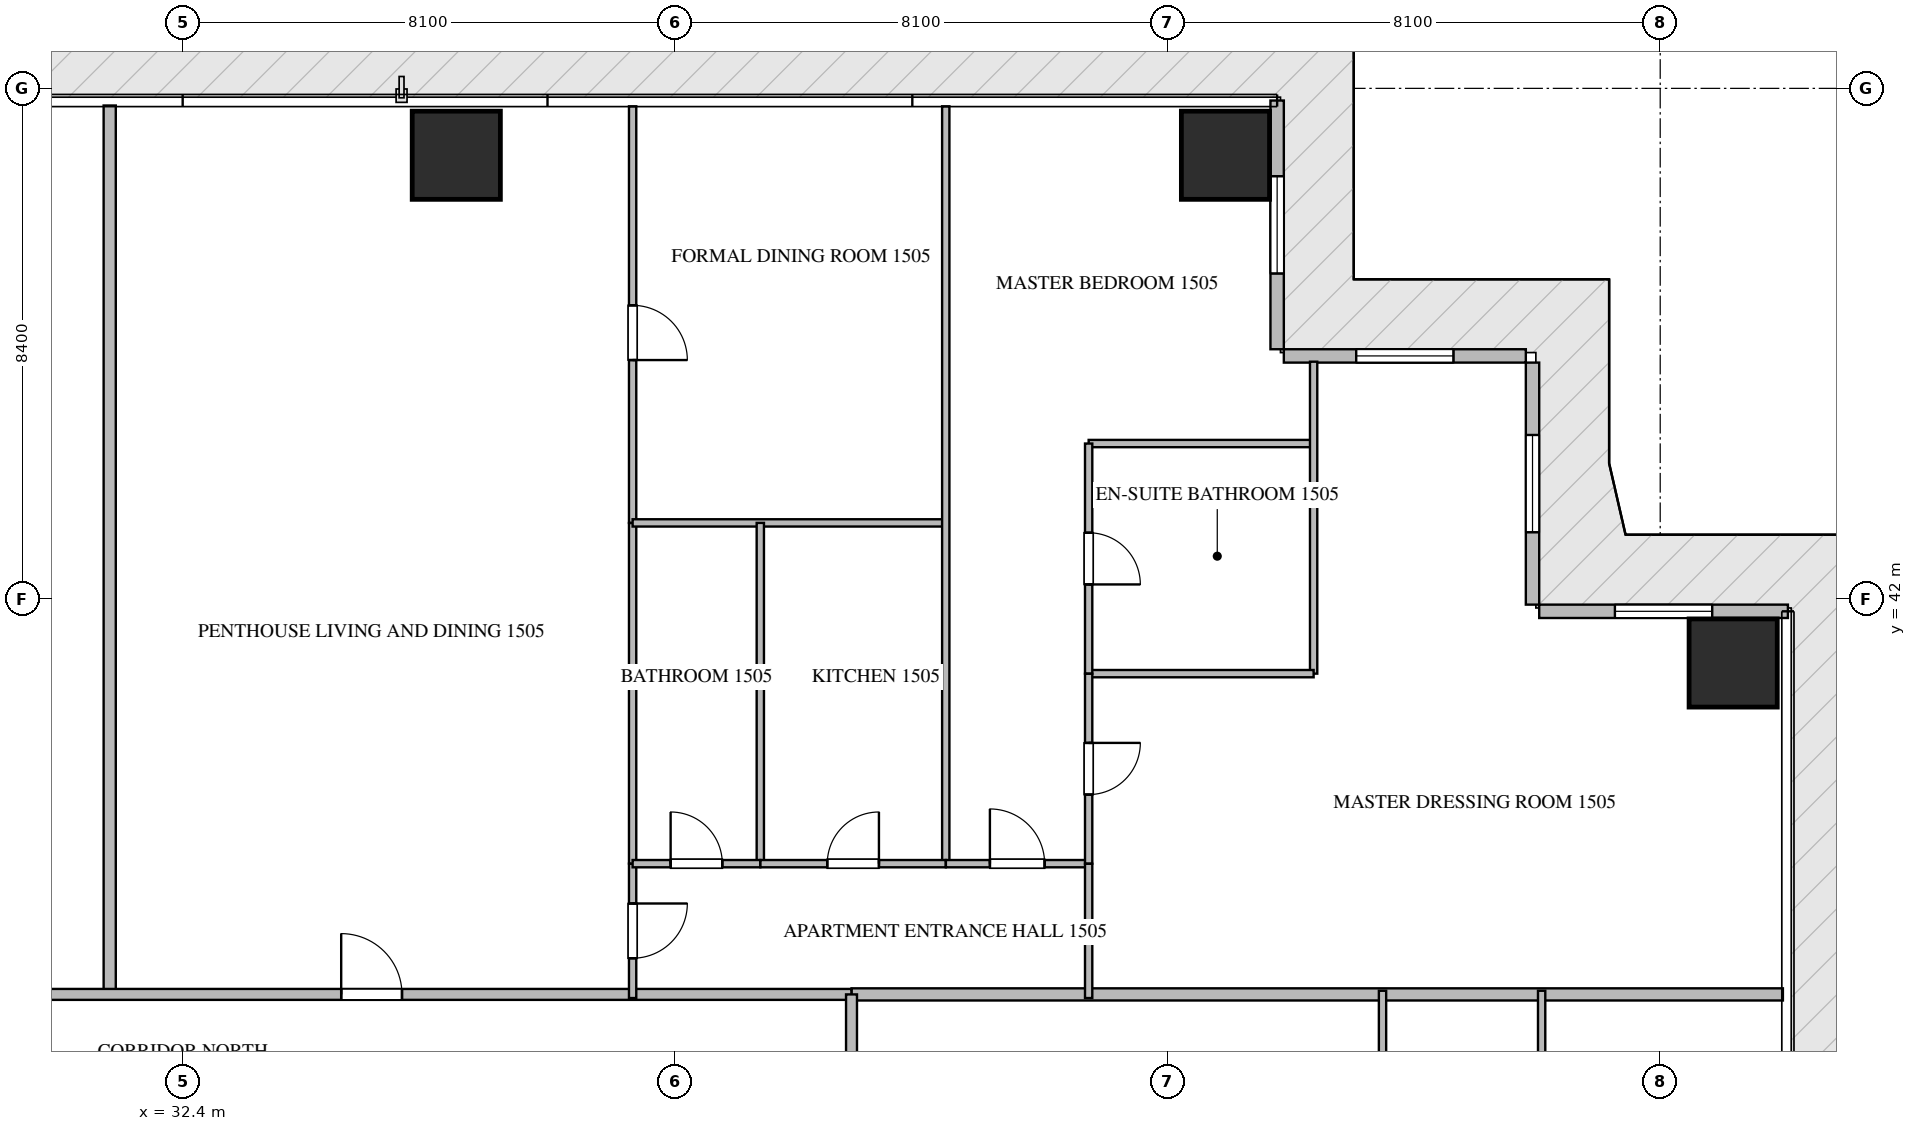
"""IFC4 building model, lengths in metres.
Left out: names, types, materials, properties, quantities, classifications, styles, units other than length and angle.
Written with IfcOpenShell. Run it as: python <this file> out.ifc"""

import sys

from ifc_helpers import new_model, si_unit, direction, frame, frame_2d, origin, origin_2d, place, context, subcontext, project, spatial, rectangle, extrude, source, transform, mapped, element, fill, save


model = new_model("IFC4")
c1 = context("Model", 3, precision=1e-05, world=origin(), true_north=direction((0.0, 1.0)))
c2 = subcontext(c1, "Body", "Model", "MODEL_VIEW")
j1 = project(units=[si_unit("LENGTHUNIT", "METRE"), si_unit("PLANEANGLEUNIT", "RADIAN")], contexts=[c1])
p1 = place(None, origin())
s1 = spatial("IfcSite", under=j1, at=p1, CompositionType="ELEMENT")
p2 = place(p1, origin())
s2 = spatial("IfcBuilding", under=s1, at=p2, CompositionType="ELEMENT")
p3 = place(p2, frame((0.0, 0.0, 64.2)))
s3 = spatial("IfcBuildingStorey", under=s2, at=p3, CompositionType="ELEMENT", Elevation=64.2)
m1 = source(origin(), c2, "Body", "SweptSolid", [
    extrude(rectangle(XDim=1.45, YDim=1.45, at=origin_2d()), origin(), (0.0, 0.0, 1.0), 3.75),
])
for number, where, z_axis, x_axis in (
    (1, (36.9, 49.3, -0.26), (0.0, 0.0, 1.0), (1.0, 0.0, 0.0)),
    (2, (49.55, 49.3, -0.26), (0.0, 0.0, 1.0), (1.0, 0.0, 0.0)),
    (3, (57.9, 40.95, -0.26), (0.0, 0.0, 1.0), (1.0, 0.0, 0.0)),
):
    element("IfcColumn", number, at=place(p3, frame(where, z_axis=z_axis, x_axis=x_axis)), inside=s3, PredefinedType="COLUMN", context=c2, shape_type="MappedRepresentation", body=[
        mapped(m1, transform((0.0, 0.0, 0.0), scale=1.0)),
    ])
p4 = place(p3, frame((58.8, 41.8, 0.0), z_axis=(0.0, 0.0, 1.0), x_axis=(-1.0, 0.0, 0.0)))
e4 = element("IfcWall", 4, at=p4, inside=s3, PredefinedType="ELEMENTEDWALL", context=c2, shape_type="SweptSolid", body=[
    extrude(rectangle(XDim=4.09, YDim=0.22, at=frame_2d((2.045, 0.0))), origin(), (0.0, 0.0, 1.0), 3.475),
])
p5 = place(p4, frame((1.245, 0.0, 0.65)))
e5 = element("IfcOpeningElement", 5, at=p5, cuts=e4, PredefinedType="OPENING", context=c2, shape_type="SweptSolid", body=[
    extrude(rectangle(XDim=1.6, YDim=2.1, at=frame_2d((0.8, 1.05))), frame((0.0, 0.12, 0.0), z_axis=(0.0, -1.0, 0.0), x_axis=(1.0, 0.0, 0.0)), (0.0, 0.0, 1.0), 0.24),
])
p6 = place(p3, frame((54.6, 41.91, 0.0), z_axis=(0.0, 0.0, 1.0), x_axis=(0.0, 1.0, 0.0)))
e6 = element("IfcWall", 6, at=p6, inside=s3, PredefinedType="ELEMENTEDWALL", context=c2, shape_type="SweptSolid", body=[
    extrude(rectangle(XDim=3.98, YDim=0.22, at=frame_2d((1.99, 0.0))), origin(), (0.0, 0.0, 1.0), 3.475),
])
p7 = place(p6, frame((1.19, 0.0, 0.65)))
e7 = element("IfcOpeningElement", 7, at=p7, cuts=e6, PredefinedType="OPENING", context=c2, shape_type="SweptSolid", body=[
    extrude(rectangle(XDim=1.6, YDim=2.1, at=frame_2d((0.8, 1.05))), frame((0.0, 0.12, 0.0), z_axis=(0.0, -1.0, 0.0), x_axis=(1.0, 0.0, 0.0)), (0.0, 0.0, 1.0), 0.24),
])
p8 = place(p3, frame((54.49, 46.0, 0.0), z_axis=(0.0, 0.0, 1.0), x_axis=(-1.0, 0.0, 0.0)))
e8 = element("IfcWall", 8, at=p8, inside=s3, PredefinedType="ELEMENTEDWALL", context=c2, shape_type="SweptSolid", body=[
    extrude(rectangle(XDim=3.98, YDim=0.22, at=frame_2d((1.99, 0.0))), origin(), (0.0, 0.0, 1.0), 3.475),
])
p9 = place(p8, frame((1.19, 0.0, 0.65)))
e9 = element("IfcOpeningElement", 9, at=p9, cuts=e8, PredefinedType="OPENING", context=c2, shape_type="SweptSolid", body=[
    extrude(rectangle(XDim=1.6, YDim=2.1, at=frame_2d((0.8, 1.05))), frame((0.0, 0.12, 0.0), z_axis=(0.0, -1.0, 0.0), x_axis=(1.0, 0.0, 0.0)), (0.0, 0.0, 1.0), 0.24),
])
p10 = place(p3, frame((50.4, 46.11, 0.0), z_axis=(0.0, 0.0, 1.0), x_axis=(0.0, 1.0, 0.0)))
e10 = element("IfcWall", 10, at=p10, inside=s3, PredefinedType="ELEMENTEDWALL", context=c2, shape_type="SweptSolid", body=[
    extrude(rectangle(XDim=4.09, YDim=0.22, at=frame_2d((2.045, 0.0))), origin(), (0.0, 0.0, 1.0), 3.475),
])
p11 = place(p10, frame((1.245, 0.0, 0.65)))
e11 = element("IfcOpeningElement", 11, at=p11, cuts=e10, PredefinedType="OPENING", context=c2, shape_type="SweptSolid", body=[
    extrude(rectangle(XDim=1.6, YDim=2.1, at=frame_2d((0.8, 1.05))), frame((0.0, 0.12, 0.0), z_axis=(0.0, -1.0, 0.0), x_axis=(1.0, 0.0, 0.0)), (0.0, 0.0, 1.0), 0.24),
])
p12 = place(p3, frame((31.2, 35.5, 0.0), z_axis=(0.0, 0.0, 1.0), x_axis=(0.0, 1.0, 0.0)))
e12 = element("IfcWall", 12, at=p12, inside=s3, PredefinedType="PARTITIONING", context=c2, shape_type="SweptSolid", body=[
    extrude(rectangle(XDim=14.618, YDim=0.2, at=frame_2d((7.309, 0.0))), origin(), (0.0, 0.0, 1.0), 3.49),
])
p13 = place(p3, frame((43.4, 35.5, 0.0), z_axis=(0.0, 0.0, 1.0), x_axis=(1.0, 0.0, 0.0)))
e13 = element("IfcWall", 13, at=p13, inside=s3, PredefinedType="PARTITIONING", context=c2, shape_type="SweptSolid", body=[
    extrude(rectangle(XDim=15.318, YDim=0.2, at=frame_2d((7.659, 0.0))), origin(), (0.0, 0.0, 1.0), 3.49),
])
p14 = place(p3, frame((21.402, 35.5, 0.0), z_axis=(0.0, 0.0, 1.0), x_axis=(1.0, 0.0, 0.0)))
e14 = element("IfcWall", 14, at=p14, inside=s3, PredefinedType="PARTITIONING", context=c2, shape_type="SweptSolid", body=[
    extrude(rectangle(XDim=21.996, YDim=0.18, at=frame_2d((10.998, 0.0))), origin(), (0.0, 0.0, 1.0), 3.49),
])
p15 = place(p14, frame((6.425, 0.0, 0.0)))
e15 = element("IfcOpeningElement", 15, at=p15, cuts=e14, PredefinedType="OPENING", context=c2, shape_type="SweptSolid", body=[
    extrude(rectangle(XDim=1.0, YDim=2.15, at=frame_2d((0.5, 1.075))), frame((0.0, 0.1, 0.0), z_axis=(0.0, -1.0, 0.0), x_axis=(1.0, 0.0, 0.0)), (0.0, 0.0, 1.0), 0.2),
])
p16 = place(p14, frame((13.605, 0.0, 0.0)))
e16 = element("IfcOpeningElement", 16, at=p16, cuts=e14, PredefinedType="OPENING", context=c2, shape_type="SweptSolid", body=[
    extrude(rectangle(XDim=1.0, YDim=2.15, at=frame_2d((0.5, 1.075))), frame((0.0, 0.1, 0.0), z_axis=(0.0, -1.0, 0.0), x_axis=(1.0, 0.0, 0.0)), (0.0, 0.0, 1.0), 0.2),
])
p17 = place(p3, frame((43.4, 14.9, 0.0), z_axis=(0.0, 0.0, 1.0), x_axis=(0.0, 1.0, 0.0)))
e17 = element("IfcWall", 17, at=p17, inside=s3, PredefinedType="PARTITIONING", context=c2, shape_type="SweptSolid", body=[
    extrude(rectangle(XDim=20.6, YDim=0.18, at=frame_2d((10.3, 0.0))), origin(), (0.0, 0.0, 1.0), 3.49),
])
p18 = place(p17, frame((1.96, 0.0, 0.0)))
e18 = element("IfcOpeningElement", 18, at=p18, cuts=e17, PredefinedType="OPENING", context=c2, shape_type="SweptSolid", body=[
    extrude(rectangle(XDim=1.0, YDim=2.15, at=frame_2d((0.5, 1.075))), frame((0.0, 0.1, 0.0), z_axis=(0.0, -1.0, 0.0), x_axis=(1.0, 0.0, 0.0)), (0.0, 0.0, 1.0), 0.2),
])
p19 = place(p3, frame((39.8, 37.65, 0.0), z_axis=(0.0, 0.0, 1.0), x_axis=(0.0, -1.0, 0.0)))
e19 = element("IfcWall", 19, at=p19, inside=s3, PredefinedType="PARTITIONING", context=c2, shape_type="SweptSolid", body=[
    extrude(rectangle(XDim=2.21, YDim=0.12, at=frame_2d((1.105, 0.0))), origin(), (0.0, 0.0, 1.0), 3.49),
])
p20 = place(p19, frame((0.655, 0.0, 0.0)))
e20 = element("IfcOpeningElement", 20, at=p20, cuts=e19, PredefinedType="OPENING", context=c2, shape_type="SweptSolid", body=[
    extrude(rectangle(XDim=0.9, YDim=2.1, at=frame_2d((0.45, 1.05))), frame((0.0, 0.07, 0.0), z_axis=(0.0, -1.0, 0.0), x_axis=(1.0, 0.0, 0.0)), (0.0, 0.0, 1.0), 0.14),
])
p21 = place(p3, frame((39.8, 50.105, 0.0), z_axis=(0.0, 0.0, 1.0), x_axis=(0.0, -1.0, 0.0)))
e21 = element("IfcWall", 21, at=p21, inside=s3, PredefinedType="PARTITIONING", context=c2, shape_type="SweptSolid", body=[
    extrude(rectangle(XDim=6.851, YDim=0.12, at=frame_2d((3.426, 0.0))), origin(), (0.0, 0.0, 1.0), 3.49),
])
p22 = place(p21, frame((3.273, 0.0, 0.0)))
e22 = element("IfcOpeningElement", 22, at=p22, cuts=e21, PredefinedType="OPENING", context=c2, shape_type="SweptSolid", body=[
    extrude(rectangle(XDim=0.9, YDim=2.1, at=frame_2d((0.45, 1.05))), frame((0.0, 0.07, 0.0), z_axis=(0.0, -1.0, 0.0), x_axis=(1.0, 0.0, 0.0)), (0.0, 0.0, 1.0), 0.14),
])
p23 = place(p3, frame((39.8, 43.252, 0.0), z_axis=(0.0, 0.0, 1.0), x_axis=(0.0, -1.0, 0.0)))
e23 = element("IfcWall", 23, at=p23, inside=s3, PredefinedType="PARTITIONING", context=c2, shape_type="SweptSolid", body=[
    extrude(rectangle(XDim=5.6, YDim=0.12, at=frame_2d((2.8, 0.0))), origin(), (0.0, 0.0, 1.0), 3.49),
])
p24 = place(p3, frame((39.8, 43.254, 0.0), z_axis=(0.0, 0.0, 1.0), x_axis=(1.0, 0.0, 0.0)))
e24 = element("IfcWall", 24, at=p24, inside=s3, PredefinedType="PARTITIONING", context=c2, shape_type="SweptSolid", body=[
    extrude(rectangle(XDim=5.15, YDim=0.12, at=frame_2d((2.575, 0.0))), origin(), (0.0, 0.0, 1.0), 3.49),
])
p25 = place(p3, frame((44.95, 50.105, 0.0), z_axis=(0.0, 0.0, 1.0), x_axis=(0.0, -1.0, 0.0)))
e25 = element("IfcWall", 25, at=p25, inside=s3, PredefinedType="PARTITIONING", context=c2, shape_type="SweptSolid", body=[
    extrude(rectangle(XDim=12.455, YDim=0.12, at=frame_2d((6.228, 0.0))), origin(), (0.0, 0.0, 1.0), 3.49),
])
p26 = place(p3, frame((41.9, 43.254, 0.0), z_axis=(0.0, 0.0, 1.0), x_axis=(0.0, -1.0, 0.0)))
e26 = element("IfcWall", 26, at=p26, inside=s3, PredefinedType="PARTITIONING", context=c2, shape_type="SweptSolid", body=[
    extrude(rectangle(XDim=5.604, YDim=0.12, at=frame_2d((2.802, 0.0))), origin(), (0.0, 0.0, 1.0), 3.49),
])
p27 = place(p3, frame((39.8, 37.65, 0.0), z_axis=(0.0, 0.0, 1.0), x_axis=(1.0, 0.0, 0.0)))
e27 = element("IfcWall", 27, at=p27, inside=s3, PredefinedType="PARTITIONING", context=c2, shape_type="SweptSolid", body=[
    extrude(rectangle(XDim=2.1, YDim=0.12, at=frame_2d((1.05, 0.0))), origin(), (0.0, 0.0, 1.0), 3.49),
])
p28 = place(p27, frame((0.625, 0.0, 0.0)))
e28 = element("IfcOpeningElement", 28, at=p28, cuts=e27, PredefinedType="OPENING", context=c2, shape_type="SweptSolid", body=[
    extrude(rectangle(XDim=0.85, YDim=2.1, at=frame_2d((0.425, 1.05))), frame((0.0, 0.07, 0.0), z_axis=(0.0, -1.0, 0.0), x_axis=(1.0, 0.0, 0.0)), (0.0, 0.0, 1.0), 0.14),
])
p29 = place(p3, frame((41.902, 37.65, 0.0), z_axis=(0.0, 0.0, 1.0), x_axis=(1.0, 0.0, 0.0)))
e29 = element("IfcWall", 29, at=p29, inside=s3, PredefinedType="PARTITIONING", context=c2, shape_type="SweptSolid", body=[
    extrude(rectangle(XDim=3.048, YDim=0.12, at=frame_2d((1.524, 0.0))), origin(), (0.0, 0.0, 1.0), 3.49),
])
p30 = place(p29, frame((1.099, 0.0, 0.0)))
e30 = element("IfcOpeningElement", 30, at=p30, cuts=e29, PredefinedType="OPENING", context=c2, shape_type="SweptSolid", body=[
    extrude(rectangle(XDim=0.85, YDim=2.1, at=frame_2d((0.425, 1.05))), frame((0.0, 0.07, 0.0), z_axis=(0.0, -1.0, 0.0), x_axis=(1.0, 0.0, 0.0)), (0.0, 0.0, 1.0), 0.14),
])
p31 = place(p3, frame((44.952, 37.65, 0.0), z_axis=(0.0, 0.0, 1.0), x_axis=(1.0, 0.0, 0.0)))
e31 = element("IfcWall", 31, at=p31, inside=s3, PredefinedType="PARTITIONING", context=c2, shape_type="SweptSolid", body=[
    extrude(rectangle(XDim=2.348, YDim=0.12, at=frame_2d((1.174, 0.0))), origin(), (0.0, 0.0, 1.0), 3.49),
])
p32 = place(p31, frame((0.724, 0.0, 0.0)))
e32 = element("IfcOpeningElement", 32, at=p32, cuts=e31, PredefinedType="OPENING", context=c2, shape_type="SweptSolid", body=[
    extrude(rectangle(XDim=0.9, YDim=2.1, at=frame_2d((0.45, 1.05))), frame((0.0, 0.07, 0.0), z_axis=(0.0, -1.0, 0.0), x_axis=(1.0, 0.0, 0.0)), (0.0, 0.0, 1.0), 0.14),
])
p33 = place(p3, frame((47.3, 44.559, 0.0), z_axis=(0.0, 0.0, 1.0), x_axis=(1.0, 0.0, 0.0)))
e33 = element("IfcWall", 33, at=p33, inside=s3, PredefinedType="PARTITIONING", context=c2, shape_type="SweptSolid", body=[
    extrude(rectangle(XDim=3.7, YDim=0.12, at=frame_2d((1.85, 0.0))), origin(), (0.0, 0.0, 1.0), 3.49),
])
p34 = place(p3, frame((51.0, 45.905, 0.0), z_axis=(0.0, 0.0, 1.0), x_axis=(0.0, -1.0, 0.0)))
e34 = element("IfcWall", 34, at=p34, inside=s3, PredefinedType="PARTITIONING", context=c2, shape_type="SweptSolid", body=[
    extrude(rectangle(XDim=5.13, YDim=0.12, at=frame_2d((2.565, 0.0))), origin(), (0.0, 0.0, 1.0), 3.49),
])
p35 = place(p3, frame((47.3, 40.775, 0.0), z_axis=(0.0, 0.0, 1.0), x_axis=(1.0, 0.0, 0.0)))
e35 = element("IfcWall", 35, at=p35, inside=s3, PredefinedType="PARTITIONING", context=c2, shape_type="SweptSolid", body=[
    extrude(rectangle(XDim=3.7, YDim=0.12, at=frame_2d((1.85, 0.0))), origin(), (0.0, 0.0, 1.0), 2.922),
])
p36 = place(p3, frame((47.3, 44.559, 0.0), z_axis=(0.0, 0.0, 1.0), x_axis=(0.0, -1.0, 0.0)))
e36 = element("IfcWall", 36, at=p36, inside=s3, PredefinedType="PARTITIONING", context=c2, shape_type="SweptSolid", body=[
    extrude(rectangle(XDim=3.784, YDim=0.12, at=frame_2d((1.892, 0.0))), origin(), (0.0, 0.0, 1.0), 3.49),
])
p37 = place(p36, frame((1.467, 0.0, 0.0)))
e37 = element("IfcOpeningElement", 37, at=p37, cuts=e36, PredefinedType="OPENING", context=c2, shape_type="SweptSolid", body=[
    extrude(rectangle(XDim=0.85, YDim=2.1, at=frame_2d((0.425, 1.05))), frame((0.0, 0.07, 0.0), z_axis=(0.0, -1.0, 0.0), x_axis=(1.0, 0.0, 0.0)), (0.0, 0.0, 1.0), 0.14),
])
p38 = place(p3, frame((47.3, 40.773, 0.0), z_axis=(0.0, 0.0, 1.0), x_axis=(0.0, -1.0, 0.0)))
e38 = element("IfcWall", 38, at=p38, inside=s3, PredefinedType="PARTITIONING", context=c2, shape_type="SweptSolid", body=[
    extrude(rectangle(XDim=3.123, YDim=0.12, at=frame_2d((1.562, 0.0))), origin(), (0.0, 0.0, 1.0), 3.49),
])
p39 = place(p38, frame((1.137, 0.0, 0.0)))
e39 = element("IfcOpeningElement", 39, at=p39, cuts=e38, PredefinedType="OPENING", context=c2, shape_type="SweptSolid", body=[
    extrude(rectangle(XDim=0.85, YDim=2.1, at=frame_2d((0.425, 1.05))), frame((0.0, 0.07, 0.0), z_axis=(0.0, -1.0, 0.0), x_axis=(1.0, 0.0, 0.0)), (0.0, 0.0, 1.0), 0.14),
])
p40 = place(p3, frame((47.3, 37.648, 0.0), z_axis=(0.0, 0.0, 1.0), x_axis=(0.0, -1.0, 0.0)))
e40 = element("IfcWall", 40, at=p40, inside=s3, PredefinedType="PARTITIONING", context=c2, shape_type="SweptSolid", body=[
    extrude(rectangle(XDim=2.208, YDim=0.12, at=frame_2d((1.104, 0.0))), origin(), (0.0, 0.0, 1.0), 3.49),
])
for number, where, z_axis, x_axis in (
    (41, (54.75, 30.15, 0.0), (0.0, 0.0, 1.0), (0.0, 1.0, 0.0)),
    (42, (52.133, 30.15, 0.0), (0.0, 0.0, 1.0), (0.0, 1.0, 0.0)),
):
    element("IfcWall", number, at=place(p3, frame(where, z_axis=z_axis, x_axis=x_axis)), inside=s3, PredefinedType="PARTITIONING", context=c2, shape_type="SweptSolid", body=[
        extrude(rectangle(XDim=5.41, YDim=0.12, at=frame_2d((2.705, 0.0))), origin(), (0.0, 0.0, 1.0), 3.49),
    ])
m2 = source(origin(), c2, "Body", "SweptSolid", [
    extrude(rectangle(XDim=1.6, YDim=2.1, at=frame_2d((0.8, 1.05))), frame((0.0, 0.03, 0.0), z_axis=(0.0, -1.0, 0.0), x_axis=(1.0, 0.0, 0.0)), (0.0, 0.0, 1.0), 0.06),
])
p41 = place(p5, origin())
e43 = element("IfcWindow", 43, at=p41, inside=s3, PartitioningType="SINGLE_PANEL", PredefinedType="WINDOW", context=c2, shape_type="MappedRepresentation", body=[
    mapped(m2, transform((0.0, 0.0, 0.0), scale=1.0)),
])
fill(e5, e43)
p42 = place(p7, origin())
e44 = element("IfcWindow", 44, at=p42, inside=s3, PartitioningType="SINGLE_PANEL", PredefinedType="WINDOW", context=c2, shape_type="MappedRepresentation", body=[
    mapped(m2, transform((0.0, 0.0, 0.0), scale=1.0)),
])
fill(e7, e44)
p43 = place(p9, origin())
e45 = element("IfcWindow", 45, at=p43, inside=s3, PartitioningType="SINGLE_PANEL", PredefinedType="WINDOW", context=c2, shape_type="MappedRepresentation", body=[
    mapped(m2, transform((0.0, 0.0, 0.0), scale=1.0)),
])
fill(e9, e45)
p44 = place(p11, origin())
e46 = element("IfcWindow", 46, at=p44, inside=s3, PartitioningType="SINGLE_PANEL", PredefinedType="WINDOW", context=c2, shape_type="MappedRepresentation", body=[
    mapped(m2, transform((0.0, 0.0, 0.0), scale=1.0)),
])
fill(e11, e46)
m3 = source(origin(), c2, "Body", "SweptSolid", [
    extrude(rectangle(XDim=1.0, YDim=2.15, at=frame_2d((0.5, 1.075))), frame((0.0, 0.025, 0.0), z_axis=(0.0, -1.0, 0.0), x_axis=(1.0, 0.0, 0.0)), (0.0, 0.0, 1.0), 0.05),
])
p45 = place(p16, origin())
e47 = element("IfcDoor", 47, at=p45, inside=s3, OperationType="SINGLE_SWING_LEFT", PredefinedType="DOOR", context=c2, shape_type="MappedRepresentation", body=[
    mapped(m3, transform((0.0, 0.0, 0.0), scale=1.0)),
])
fill(e16, e47)
m4 = source(origin(), c2, "Body", "SweptSolid", [
    extrude(rectangle(XDim=0.9, YDim=2.1, at=frame_2d((0.45, 1.05))), frame((0.0, 0.025, 0.0), z_axis=(0.0, -1.0, 0.0), x_axis=(1.0, 0.0, 0.0)), (0.0, 0.0, 1.0), 0.05),
])
p46 = place(p20, origin())
e48 = element("IfcDoor", 48, at=p46, inside=s3, OperationType="SINGLE_SWING_LEFT", PredefinedType="DOOR", context=c2, shape_type="MappedRepresentation", body=[
    mapped(m4, transform((0.0, 0.0, 0.0), scale=1.0)),
])
fill(e20, e48)
p47 = place(p22, origin())
e49 = element("IfcDoor", 49, at=p47, inside=s3, OperationType="SINGLE_SWING_RIGHT", PredefinedType="DOOR", context=c2, shape_type="MappedRepresentation", body=[
    mapped(m4, transform((0.0, 0.0, 0.0), scale=1.0)),
])
fill(e22, e49)
m5 = source(origin(), c2, "Body", "SweptSolid", [
    extrude(rectangle(XDim=0.85, YDim=2.1, at=frame_2d((0.425, 1.05))), frame((0.0, 0.025, 0.0), z_axis=(0.0, -1.0, 0.0), x_axis=(1.0, 0.0, 0.0)), (0.0, 0.0, 1.0), 0.05),
])
p48 = place(p28, origin())
e50 = element("IfcDoor", 50, at=p48, inside=s3, OperationType="SINGLE_SWING_LEFT", PredefinedType="DOOR", context=c2, shape_type="MappedRepresentation", body=[
    mapped(m5, transform((0.0, 0.0, 0.0), scale=1.0)),
])
fill(e28, e50)
p49 = place(p30, origin())
e51 = element("IfcDoor", 51, at=p49, inside=s3, OperationType="SINGLE_SWING_RIGHT", PredefinedType="DOOR", context=c2, shape_type="MappedRepresentation", body=[
    mapped(m5, transform((0.0, 0.0, 0.0), scale=1.0)),
])
fill(e30, e51)
p50 = place(p32, origin())
e52 = element("IfcDoor", 52, at=p50, inside=s3, OperationType="SINGLE_SWING_LEFT", PredefinedType="DOOR", context=c2, shape_type="MappedRepresentation", body=[
    mapped(m4, transform((0.0, 0.0, 0.0), scale=1.0)),
])
fill(e32, e52)
p51 = place(p37, origin())
e53 = element("IfcDoor", 53, at=p51, inside=s3, OperationType="SINGLE_SWING_RIGHT", PredefinedType="DOOR", context=c2, shape_type="MappedRepresentation", body=[
    mapped(m5, transform((0.0, 0.0, 0.0), scale=1.0)),
])
fill(e37, e53)
p52 = place(p39, origin())
e54 = element("IfcDoor", 54, at=p52, inside=s3, OperationType="SINGLE_SWING_LEFT", PredefinedType="DOOR", context=c2, shape_type="MappedRepresentation", body=[
    mapped(m5, transform((0.0, 0.0, 0.0), scale=1.0)),
])
fill(e39, e54)
save(model, sys.argv[1])
